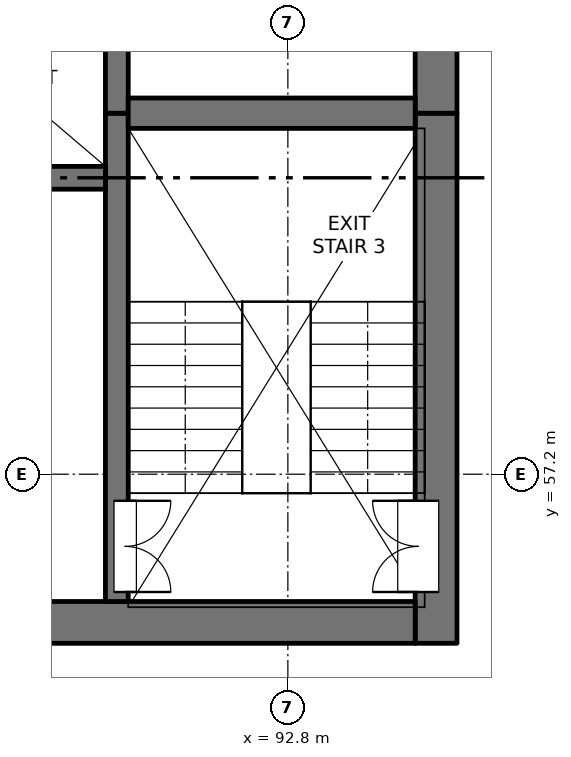
"""IFC4 building model, lengths in metres.
Left out: names, types, materials, properties, quantities, classifications, styles, units other than length and angle.
Written with IfcOpenShell. Run it as: python <this file> out.ifc"""

import sys

from ifc_helpers import new_model, si_unit, direction, frame, frame_2d, origin, place, context, subcontext, project, spatial, rectangle, extrude, element, fill, save


model = new_model("IFC4")
c1 = context("Model", 3, precision=1e-05, world=origin(), true_north=direction((0.0, 1.0)))
c2 = subcontext(c1, "Body", "Model", "MODEL_VIEW")
j1 = project(units=[si_unit("LENGTHUNIT", "METRE"), si_unit("PLANEANGLEUNIT", "RADIAN")], contexts=[c1])
p1 = place(None, origin())
s1 = spatial("IfcSite", under=j1, at=p1, CompositionType="ELEMENT")
p2 = place(p1, origin())
s2 = spatial("IfcBuilding", under=s1, at=p2, CompositionType="ELEMENT")
p3 = place(p2, frame((0.0, 0.0, 103.3)))
s3 = spatial("IfcBuildingStorey", under=s2, at=p3, CompositionType="ELEMENT", Elevation=103.3)
p4 = place(p3, frame((94.75, 54.975, -0.25), z_axis=(0.0, 0.0, 1.0), x_axis=(0.0, 1.0, 0.0)))
e1 = element("IfcWall", 1, at=p4, inside=s3, PredefinedType="SOLIDWALL", context=c2, shape_type="SweptSolid", body=[
    extrude(rectangle(XDim=6.975, YDim=0.55, at=frame_2d((3.487, 0.0))), origin(), (0.0, 0.0, 1.0), 3.4),
])
p5 = place(p4, frame((0.675, 0.0, 0.25)))
e2 = element("IfcOpeningElement", 2, at=p5, cuts=e1, PredefinedType="OPENING", context=c2, shape_type="SweptSolid", body=[
    extrude(rectangle(XDim=1.2, YDim=2.1, at=frame_2d((0.6, 1.05))), frame((0.0, 0.285, 0.0), z_axis=(0.0, -1.0, 0.0), x_axis=(1.0, 0.0, 0.0)), (0.0, 0.0, 1.0), 0.57),
])
p6 = place(p3, frame((94.75, 61.95, -0.25), z_axis=(0.0, 0.0, 1.0), x_axis=(0.0, 1.0, 0.0)))
e3 = element("IfcWall", 3, at=p6, inside=s3, PredefinedType="SOLIDWALL", context=c2, shape_type="SweptSolid", body=[
    extrude(rectangle(XDim=15.35, YDim=0.55, at=frame_2d((7.675, 0.0))), origin(), (0.0, 0.0, 1.0), 3.4),
])
p7 = place(p6, frame((0.925, 0.0, 0.25)))
e4 = element("IfcOpeningElement", 4, at=p7, cuts=e3, PredefinedType="OPENING", context=c2, shape_type="SweptSolid", body=[
    extrude(rectangle(XDim=0.9, YDim=2.1, at=frame_2d((0.45, 1.05))), frame((0.0, 0.285, 0.0), z_axis=(0.0, -1.0, 0.0), x_axis=(1.0, 0.0, 0.0)), (0.0, 0.0, 1.0), 0.57),
])
p8 = place(p6, frame((5.15, 0.0, 0.25)))
e5 = element("IfcOpeningElement", 5, at=p8, cuts=e3, PredefinedType="OPENING", context=c2, shape_type="SweptSolid", body=[
    extrude(rectangle(XDim=0.9, YDim=2.1, at=frame_2d((0.45, 1.05))), frame((0.0, 0.285, 0.0), z_axis=(0.0, -1.0, 0.0), x_axis=(1.0, 0.0, 0.0)), (0.0, 0.0, 1.0), 0.57),
])
p9 = place(p6, frame((9.65, 0.0, 0.25)))
e6 = element("IfcOpeningElement", 6, at=p9, cuts=e3, PredefinedType="OPENING", context=c2, shape_type="SweptSolid", body=[
    extrude(rectangle(XDim=0.9, YDim=2.1, at=frame_2d((0.45, 1.05))), frame((0.0, 0.285, 0.0), z_axis=(0.0, -1.0, 0.0), x_axis=(1.0, 0.0, 0.0)), (0.0, 0.0, 1.0), 0.57),
])
p10 = place(p6, frame((13.1, 0.0, 0.25)))
e7 = element("IfcOpeningElement", 7, at=p10, cuts=e3, PredefinedType="OPENING", context=c2, shape_type="SweptSolid", body=[
    extrude(rectangle(XDim=0.9, YDim=2.1, at=frame_2d((0.45, 1.05))), frame((0.0, 0.285, 0.0), z_axis=(0.0, -1.0, 0.0), x_axis=(1.0, 0.0, 0.0)), (0.0, 0.0, 1.0), 0.57),
])
p11 = place(p3, frame((75.525, 55.25, -0.25), z_axis=(0.0, 0.0, 1.0), x_axis=(1.0, 0.0, 0.0)))
e8 = element("IfcWall", 8, at=p11, inside=s3, PredefinedType="SOLIDWALL", context=c2, shape_type="SweptSolid", body=[
    extrude(rectangle(XDim=18.95, YDim=0.55, at=frame_2d((9.475, 0.0))), origin(), (0.0, 0.0, 1.0), 3.4),
])
p12 = place(p11, frame((8.725, 0.0, 0.25)))
e9 = element("IfcOpeningElement", 9, at=p12, cuts=e8, PredefinedType="OPENING", context=c2, shape_type="SweptSolid", body=[
    extrude(rectangle(XDim=1.5, YDim=2.1, at=frame_2d((0.75, 1.05))), frame((0.0, 0.285, 0.0), z_axis=(0.0, -1.0, 0.0), x_axis=(1.0, 0.0, 0.0)), (0.0, 0.0, 1.0), 0.57),
])
p13 = place(p3, frame((90.55, 55.525, -0.25), z_axis=(0.0, 0.0, 1.0), x_axis=(0.0, 1.0, 0.0)))
e10 = element("IfcWall", 10, at=p13, inside=s3, PredefinedType="SOLIDWALL", context=c2, shape_type="SweptSolid", body=[
    extrude(rectangle(XDim=6.425, YDim=0.3, at=frame_2d((3.212, 0.0))), origin(), (0.0, 0.0, 1.0), 3.4),
])
p14 = place(p13, frame((0.125, 0.0, 0.25)))
e11 = element("IfcOpeningElement", 11, at=p14, cuts=e10, PredefinedType="OPENING", context=c2, shape_type="SweptSolid", body=[
    extrude(rectangle(XDim=1.2, YDim=2.1, at=frame_2d((0.6, 1.05))), frame((0.0, 0.16, 0.0), z_axis=(0.0, -1.0, 0.0), x_axis=(1.0, 0.0, 0.0)), (0.0, 0.0, 1.0), 0.32),
])
p15 = place(p3, frame((90.55, 61.95, -0.25), z_axis=(0.0, 0.0, 1.0), x_axis=(0.0, 1.0, 0.0)))
e12 = element("IfcWall", 12, at=p15, inside=s3, PredefinedType="SOLIDWALL", context=c2, shape_type="SweptSolid", body=[
    extrude(rectangle(XDim=15.35, YDim=0.3, at=frame_2d((7.675, 0.0))), origin(), (0.0, 0.0, 1.0), 3.4),
])
p16 = place(p3, frame((87.4, 61.1, -0.25), z_axis=(0.0, 0.0, 1.0), x_axis=(1.0, 0.0, 0.0)))
e13 = element("IfcWall", 13, at=p16, inside=s3, PredefinedType="SOLIDWALL", context=c2, shape_type="SweptSolid", body=[
    extrude(rectangle(XDim=3.0, YDim=0.3, at=frame_2d((1.5, 0.0))), origin(), (0.0, 0.0, 1.0), 3.4),
])
p17 = place(p3, frame((90.7, 61.95, -0.25), z_axis=(0.0, 0.0, 1.0), x_axis=(1.0, 0.0, 0.0)))
e14 = element("IfcWall", 14, at=p17, inside=s3, PredefinedType="SOLIDWALL", context=c2, shape_type="SweptSolid", body=[
    extrude(rectangle(XDim=3.775, YDim=0.4, at=frame_2d((1.888, 0.0))), origin(), (0.0, 0.0, 1.0), 3.4),
])
p18 = place(p14, origin())
e15 = element("IfcDoor", 15, at=p18, inside=s3, OperationType="DOUBLE_DOOR_SINGLE_SWING", PredefinedType="DOOR", context=c2, shape_type="SweptSolid", body=[
    extrude(rectangle(XDim=1.2, YDim=2.1, at=frame_2d((0.6, 1.05))), frame((0.0, -0.085, 0.0), z_axis=(0.0, -1.0, 0.0), x_axis=(1.0, 0.0, 0.0)), (0.0, 0.0, 1.0), 0.05),
])
fill(e11, e15)
p19 = place(p5, origin())
e16 = element("IfcDoor", 16, at=p19, inside=s3, OperationType="DOUBLE_DOOR_SINGLE_SWING", PredefinedType="DOOR", context=c2, shape_type="SweptSolid", body=[
    extrude(rectangle(XDim=1.2, YDim=2.1, at=frame_2d((0.6, 1.05))), frame((0.0, 0.26, 0.0), z_axis=(0.0, -1.0, 0.0), x_axis=(1.0, 0.0, 0.0)), (0.0, 0.0, 1.0), 0.05),
])
fill(e2, e16)
save(model, sys.argv[1])
